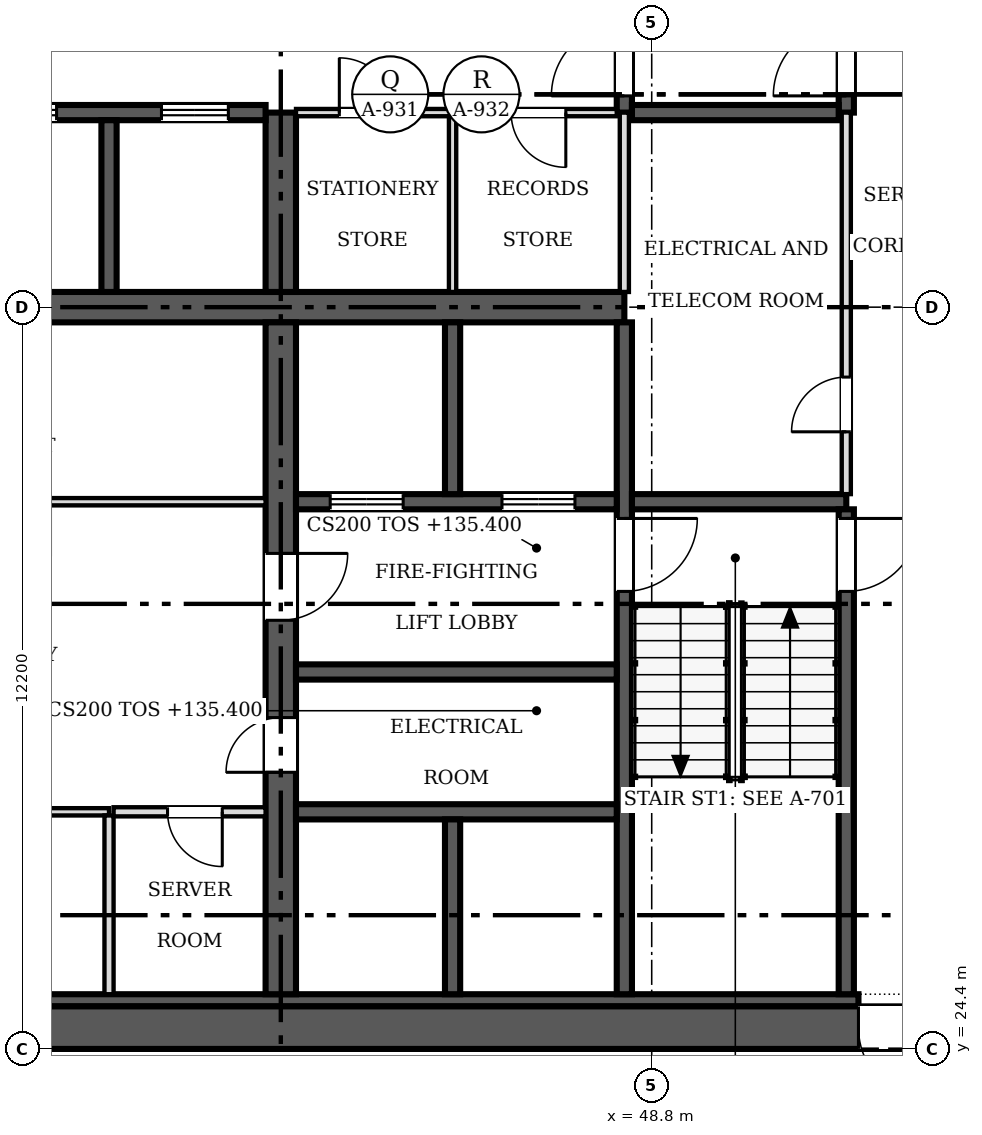
"""IFC4 building model, lengths in metres.
Left out: names, types, materials, properties, quantities, classifications, styles, units other than length and angle.
Written with IfcOpenShell. Run it as: python <this file> out.ifc"""

import sys

from ifc_helpers import new_model, si_unit, direction, frame, frame_2d, origin, place, context, subcontext, project, spatial, rectangle, extrude, source, transform, mapped, element, fill, save


model = new_model("IFC4")
c1 = context("Model", 3, precision=1e-05, world=origin(), true_north=direction((0.0, 1.0)))
c2 = subcontext(c1, "Body", "Model", "MODEL_VIEW")
j1 = project(units=[si_unit("LENGTHUNIT", "METRE"), si_unit("PLANEANGLEUNIT", "RADIAN")], contexts=[c1])
p1 = place(None, origin())
s1 = spatial("IfcSite", under=j1, at=p1, CompositionType="ELEMENT")
p2 = place(p1, origin())
s2 = spatial("IfcBuilding", under=s1, at=p2, CompositionType="ELEMENT")
p3 = place(p2, frame((0.0, 0.0, 135.4)))
s3 = spatial("IfcBuildingStorey", under=s2, at=p3, CompositionType="ELEMENT", Elevation=135.4)
p4 = place(p3, frame((54.9, 24.75, 0.0), z_axis=(0.0, 0.0, 1.0), x_axis=(-1.0, 0.0, 0.0)))
e1 = element("IfcWall", 1, at=p4, inside=s3, PredefinedType="SHEAR", context=c2, shape_type="SweptSolid", body=[
    extrude(rectangle(XDim=24.4, YDim=0.7, at=frame_2d((12.2, 0.0))), origin(), (0.0, 0.0, 1.0), 3.8),
])
m1 = source(origin(), c2, "Body", "SweptSolid", [
    extrude(rectangle(XDim=1.2, YDim=2.1, at=frame_2d((0.6, 1.05))), frame((0.0, 0.36, 0.0), z_axis=(0.0, -1.0, 0.0), x_axis=(1.0, 0.0, 0.0)), (0.0, 0.0, 1.0), 0.72),
])
p5 = place(p4, frame((1.5, 0.0, 0.0)))
e2 = element("IfcOpeningElement", 2, at=p5, cuts=e1, PredefinedType="OPENING", context=c2, shape_type="MappedRepresentation", body=[
    mapped(m1, transform((0.0, 0.0, 0.0), scale=1.0)),
])
p6 = place(p3, frame((31.2, 25.2, 0.0), z_axis=(0.0, 0.0, 1.0), x_axis=(1.0, 0.0, 0.0)))
e3 = element("IfcWall", 3, at=p6, inside=s3, PredefinedType="SOLIDWALL", context=c2, shape_type="SweptSolid", body=[
    extrude(rectangle(XDim=21.0, YDim=0.2, at=frame_2d((10.5, 0.0))), origin(), (0.0, 0.0, 1.0), 3.8),
])
p7 = place(p3, frame((31.4, 36.6, 0.0), z_axis=(0.0, 0.0, 1.0), x_axis=(1.0, 0.0, 0.0)))
e4 = element("IfcWall", 4, at=p7, inside=s3, PredefinedType="SHEAR", context=c2, shape_type="SweptSolid", body=[
    extrude(rectangle(XDim=16.95, YDim=0.5, at=frame_2d((8.475, 0.0))), origin(), (0.0, 0.0, 1.0), 3.8),
])
p8 = place(p3, frame((42.7, 36.35, 0.0), z_axis=(0.0, 0.0, 1.0), x_axis=(0.0, -1.0, 0.0)))
e5 = element("IfcWall", 5, at=p8, inside=s3, PredefinedType="SHEAR", context=c2, shape_type="SweptSolid", body=[
    extrude(rectangle(XDim=11.05, YDim=0.5, at=frame_2d((5.525, 0.0))), origin(), (0.0, 0.0, 1.0), 3.8),
])
m2 = source(origin(), c2, "Body", "SweptSolid", [
    extrude(rectangle(XDim=0.9, YDim=2.1, at=frame_2d((0.45, 1.05))), frame((0.0, 0.26, 0.0), z_axis=(0.0, -1.0, 0.0), x_axis=(1.0, 0.0, 0.0)), (0.0, 0.0, 1.0), 0.52),
])
p9 = place(p8, frame((6.5, 0.0, 0.0)))
e6 = element("IfcOpeningElement", 6, at=p9, cuts=e5, PredefinedType="OPENING", context=c2, shape_type="MappedRepresentation", body=[
    mapped(m2, transform((0.0, 0.0, 0.0), scale=1.0)),
])
m3 = source(origin(), c2, "Body", "SweptSolid", [
    extrude(rectangle(XDim=1.1, YDim=2.1, at=frame_2d((0.55, 1.05))), frame((0.0, 0.26, 0.0), z_axis=(0.0, -1.0, 0.0), x_axis=(1.0, 0.0, 0.0)), (0.0, 0.0, 1.0), 0.52),
])
p10 = place(p8, frame((3.8, 0.0, 0.0)))
e7 = element("IfcOpeningElement", 7, at=p10, cuts=e5, PredefinedType="OPENING", context=c2, shape_type="MappedRepresentation", body=[
    mapped(m3, transform((0.0, 0.0, 0.0), scale=1.0)),
])
p11 = place(p3, frame((42.7, 36.85, 0.0), z_axis=(0.0, 0.0, 1.0), x_axis=(0.0, 1.0, 0.0)))
e8 = element("IfcWall", 8, at=p11, inside=s3, PredefinedType="SHEAR", context=c2, shape_type="SweptSolid", body=[
    extrude(rectangle(XDim=2.95, YDim=0.5, at=frame_2d((1.475, 0.0))), origin(), (0.0, 0.0, 1.0), 3.8),
])
p12 = place(p3, frame((31.4, 39.8, 0.0), z_axis=(0.0, 0.0, 1.0), x_axis=(1.0, 0.0, 0.0)))
e9 = element("IfcWall", 9, at=p12, inside=s3, PredefinedType="SOLIDWALL", context=c2, shape_type="SweptSolid", body=[
    extrude(rectangle(XDim=11.05, YDim=0.25, at=frame_2d((5.525, 0.0))), origin(), (0.0, 0.0, 1.0), 3.8),
])
m4 = source(origin(), c2, "Body", "SweptSolid", [
    extrude(rectangle(XDim=1.1, YDim=2.1, at=frame_2d((0.55, 1.05))), frame((0.0, 0.135, 0.0), z_axis=(0.0, -1.0, 0.0), x_axis=(1.0, 0.0, 0.0)), (0.0, 0.0, 1.0), 0.27),
])
p13 = place(p12, frame((0.863, 0.0, 0.0)))
e10 = element("IfcOpeningElement", 10, at=p13, cuts=e9, PredefinedType="OPENING", context=c2, shape_type="MappedRepresentation", body=[
    mapped(m4, transform((0.0, 0.0, 0.0), scale=1.0)),
])
p14 = place(p12, frame((3.688, 0.0, 0.0)))
e11 = element("IfcOpeningElement", 11, at=p14, cuts=e9, PredefinedType="OPENING", context=c2, shape_type="MappedRepresentation", body=[
    mapped(m4, transform((0.0, 0.0, 0.0), scale=1.0)),
])
p15 = place(p12, frame((6.512, 0.0, 0.0)))
e12 = element("IfcOpeningElement", 12, at=p15, cuts=e9, PredefinedType="OPENING", context=c2, shape_type="MappedRepresentation", body=[
    mapped(m4, transform((0.0, 0.0, 0.0), scale=1.0)),
])
p16 = place(p12, frame((9.337, 0.0, 0.0)))
e13 = element("IfcOpeningElement", 13, at=p16, cuts=e9, PredefinedType="OPENING", context=c2, shape_type="MappedRepresentation", body=[
    mapped(m4, transform((0.0, 0.0, 0.0), scale=1.0)),
])
p17 = place(p3, frame((48.35, 36.35, 0.0), z_axis=(0.0, 0.0, 1.0), x_axis=(0.0, -1.0, 0.0)))
e14 = element("IfcWall", 14, at=p17, inside=s3, PredefinedType="SOLIDWALL", context=c2, shape_type="SweptSolid", body=[
    extrude(rectangle(XDim=11.05, YDim=0.25, at=frame_2d((5.525, 0.0))), origin(), (0.0, 0.0, 1.0), 3.8),
])
m5 = source(origin(), c2, "Body", "SweptSolid", [
    extrude(rectangle(XDim=1.2, YDim=2.1, at=frame_2d((0.6, 1.05))), frame((0.0, 0.135, 0.0), z_axis=(0.0, -1.0, 0.0), x_axis=(1.0, 0.0, 0.0)), (0.0, 0.0, 1.0), 0.27),
])
p18 = place(p17, frame((3.225, 0.0, 0.0)))
e15 = element("IfcOpeningElement", 15, at=p18, cuts=e14, PredefinedType="OPENING", context=c2, shape_type="MappedRepresentation", body=[
    mapped(m5, transform((0.0, 0.0, 0.0), scale=1.0)),
])
p19 = place(p3, frame((48.225, 33.4, 0.0), z_axis=(0.0, 0.0, 1.0), x_axis=(-1.0, 0.0, 0.0)))
e16 = element("IfcWall", 16, at=p19, inside=s3, PredefinedType="SOLIDWALL", context=c2, shape_type="SweptSolid", body=[
    extrude(rectangle(XDim=5.275, YDim=0.25, at=frame_2d((2.638, 0.0))), origin(), (0.0, 0.0, 1.0), 3.8),
])
p20 = place(p19, frame((3.512, 0.0, 0.0)))
e17 = element("IfcOpeningElement", 17, at=p20, cuts=e16, PredefinedType="OPENING", context=c2, shape_type="MappedRepresentation", body=[
    mapped(m5, transform((0.0, 0.0, 0.0), scale=1.0)),
])
p21 = place(p19, frame((0.688, 0.0, 0.0)))
e18 = element("IfcOpeningElement", 18, at=p21, cuts=e16, PredefinedType="OPENING", context=c2, shape_type="MappedRepresentation", body=[
    mapped(m5, transform((0.0, 0.0, 0.0), scale=1.0)),
])
p22 = place(p3, frame((48.475, 33.4, 0.0), z_axis=(0.0, 0.0, 1.0), x_axis=(1.0, 0.0, 0.0)))
e19 = element("IfcWall", 19, at=p22, inside=s3, PredefinedType="SOLIDWALL", context=c2, shape_type="SweptSolid", body=[
    extrude(rectangle(XDim=3.525, YDim=0.25, at=frame_2d((1.762, 0.0))), origin(), (0.0, 0.0, 1.0), 3.8),
])
p23 = place(p3, frame((48.35, 47.9, 0.0), z_axis=(0.0, 0.0, 1.0), x_axis=(0.0, -1.0, 0.0)))
e20 = element("IfcWall", 20, at=p23, inside=s3, PredefinedType="SOLIDWALL", context=c2, shape_type="SweptSolid", body=[
    extrude(rectangle(XDim=8.1, YDim=0.25, at=frame_2d((4.05, 0.0))), origin(), (0.0, 0.0, 1.0), 3.8),
])
p24 = place(p23, frame((6.625, 0.0, 0.0)))
e21 = element("IfcOpeningElement", 21, at=p24, cuts=e20, PredefinedType="OPENING", context=c2, shape_type="MappedRepresentation", body=[
    mapped(m5, transform((0.0, 0.0, 0.0), scale=1.0)),
])
p25 = place(p3, frame((52.0, 25.3, 0.0), z_axis=(0.0, 0.0, 1.0), x_axis=(0.0, 1.0, 0.0)))
e22 = element("IfcWall", 22, at=p25, inside=s3, PredefinedType="SOLIDWALL", context=c2, shape_type="SweptSolid", body=[
    extrude(rectangle(XDim=7.975, YDim=0.25, at=frame_2d((3.987, 0.0))), origin(), (0.0, 0.0, 1.0), 3.8),
])
p26 = place(p25, frame((6.625, 0.0, 0.0)))
e23 = element("IfcOpeningElement", 23, at=p26, cuts=e22, PredefinedType="OPENING", context=c2, shape_type="MappedRepresentation", body=[
    mapped(m5, transform((0.0, 0.0, 0.0), scale=1.0)),
])
p27 = place(p3, frame((52.0, 39.8, 0.0), z_axis=(0.0, 0.0, 1.0), x_axis=(0.0, 1.0, 0.0)))
e24 = element("IfcWall", 24, at=p27, inside=s3, PredefinedType="SOLIDWALL", context=c2, shape_type="SweptSolid", body=[
    extrude(rectangle(XDim=8.1, YDim=0.25, at=frame_2d((4.05, 0.0))), origin(), (0.0, 0.0, 1.0), 3.8),
])
p28 = place(p27, frame((0.275, 0.0, 0.0)))
e25 = element("IfcOpeningElement", 25, at=p28, cuts=e24, PredefinedType="OPENING", context=c2, shape_type="MappedRepresentation", body=[
    mapped(m5, transform((0.0, 0.0, 0.0), scale=1.0)),
])
for number, where, z_axis, x_axis in (
    (26, (42.95, 28.3, 0.0), (0.0, 0.0, 1.0), (1.0, 0.0, 0.0)),
    (27, (42.95, 30.6, 0.0), (0.0, 0.0, 1.0), (1.0, 0.0, 0.0)),
):
    element("IfcWall", number, at=place(p3, frame(where, z_axis=z_axis, x_axis=x_axis)), inside=s3, PredefinedType="SOLIDWALL", context=c2, shape_type="SweptSolid", body=[
        extrude(rectangle(XDim=5.275, YDim=0.25, at=frame_2d((2.638, 0.0))), origin(), (0.0, 0.0, 1.0), 3.8),
    ])
p29 = place(p3, frame((48.475, 39.8, 0.0), z_axis=(0.0, 0.0, 1.0), x_axis=(1.0, 0.0, 0.0)))
e28 = element("IfcWall", 28, at=p29, inside=s3, PredefinedType="SOLIDWALL", context=c2, shape_type="SweptSolid", body=[
    extrude(rectangle(XDim=3.4, YDim=0.25, at=frame_2d((1.7, 0.0))), origin(), (0.0, 0.0, 1.0), 3.8),
])
p30 = place(p3, frame((39.875, 36.85, 0.0), z_axis=(0.0, 0.0, 1.0), x_axis=(0.0, 1.0, 0.0)))
e29 = element("IfcWall", 29, at=p30, inside=s3, PredefinedType="SOLIDWALL", context=c2, shape_type="SweptSolid", body=[
    extrude(rectangle(XDim=2.825, YDim=0.25, at=frame_2d((1.413, 0.0))), origin(), (0.0, 0.0, 1.0), 3.8),
])
p31 = place(p3, frame((45.525, 33.525, 0.0), z_axis=(0.0, 0.0, 1.0), x_axis=(0.0, 1.0, 0.0)))
e30 = element("IfcWall", 30, at=p31, inside=s3, PredefinedType="SOLIDWALL", context=c2, shape_type="SweptSolid", body=[
    extrude(rectangle(XDim=2.825, YDim=0.25, at=frame_2d((1.413, 0.0))), origin(), (0.0, 0.0, 1.0), 3.8),
])
p32 = place(p3, frame((45.525, 25.3, 0.0), z_axis=(0.0, 0.0, 1.0), x_axis=(0.0, 1.0, 0.0)))
e31 = element("IfcWall", 31, at=p32, inside=s3, PredefinedType="SOLIDWALL", context=c2, shape_type="SweptSolid", body=[
    extrude(rectangle(XDim=2.875, YDim=0.25, at=frame_2d((1.438, 0.0))), origin(), (0.0, 0.0, 1.0), 3.8),
])
p33 = place(p3, frame((31.4, 33.4, 0.0), z_axis=(0.0, 0.0, 1.0), x_axis=(1.0, 0.0, 0.0)))
e32 = element("IfcWall", 32, at=p33, inside=s3, PredefinedType="PARTITIONING", context=c2, shape_type="SweptSolid", body=[
    extrude(rectangle(XDim=11.05, YDim=0.12, at=frame_2d((5.525, 0.0))), origin(), (0.0, 0.0, 1.0), 3.6),
])
m6 = source(origin(), c2, "Body", "SweptSolid", [
    extrude(rectangle(XDim=0.9, YDim=2.1, at=frame_2d((0.45, 1.05))), frame((0.0, 0.07, 0.0), z_axis=(0.0, -1.0, 0.0), x_axis=(1.0, 0.0, 0.0)), (0.0, 0.0, 1.0), 0.14),
])
p34 = place(p33, frame((0.962, 0.0, 0.0)))
e33 = element("IfcOpeningElement", 33, at=p34, cuts=e32, PredefinedType="OPENING", context=c2, shape_type="MappedRepresentation", body=[
    mapped(m6, transform((0.0, 0.0, 0.0), scale=1.0)),
])
p35 = place(p33, frame((6.613, 0.0, 0.0)))
e34 = element("IfcOpeningElement", 34, at=p35, cuts=e32, PredefinedType="OPENING", context=c2, shape_type="MappedRepresentation", body=[
    mapped(m6, transform((0.0, 0.0, 0.0), scale=1.0)),
])
p36 = place(p3, frame((39.875, 28.3, 0.0), z_axis=(0.0, 0.0, 1.0), x_axis=(-1.0, 0.0, 0.0)))
e35 = element("IfcWall", 35, at=p36, inside=s3, PredefinedType="PARTITIONING", context=c2, shape_type="SweptSolid", body=[
    extrude(rectangle(XDim=8.475, YDim=0.12, at=frame_2d((4.238, 0.0))), origin(), (0.0, 0.0, 1.0), 3.6),
])
p37 = place(p36, frame((3.788, 0.0, 0.0)))
e36 = element("IfcOpeningElement", 36, at=p37, cuts=e35, PredefinedType="OPENING", context=c2, shape_type="MappedRepresentation", body=[
    mapped(m6, transform((0.0, 0.0, 0.0), scale=1.0)),
])
p38 = place(p3, frame((52.0, 33.525, 0.0), z_axis=(0.0, 0.0, 1.0), x_axis=(0.0, 1.0, 0.0)))
e37 = element("IfcWall", 37, at=p38, inside=s3, PredefinedType="PARTITIONING", context=c2, shape_type="SweptSolid", body=[
    extrude(rectangle(XDim=6.275, YDim=0.15, at=frame_2d((3.138, 0.0))), origin(), (0.0, 0.0, 1.0), 3.6),
])
m7 = source(origin(), c2, "Body", "SweptSolid", [
    extrude(rectangle(XDim=0.9, YDim=2.1, at=frame_2d((0.45, 1.05))), frame((0.0, 0.085, 0.0), z_axis=(0.0, -1.0, 0.0), x_axis=(1.0, 0.0, 0.0)), (0.0, 0.0, 1.0), 0.17),
])
p39 = place(p38, frame((1.025, 0.0, 0.0)))
e38 = element("IfcOpeningElement", 38, at=p39, cuts=e37, PredefinedType="OPENING", context=c2, shape_type="MappedRepresentation", body=[
    mapped(m7, transform((0.0, 0.0, 0.0), scale=1.0)),
])
p40 = place(p3, frame((48.225, 39.8, 0.0), z_axis=(0.0, 0.0, 1.0), x_axis=(-1.0, 0.0, 0.0)))
e39 = element("IfcWall", 39, at=p40, inside=s3, PredefinedType="PARTITIONING", context=c2, shape_type="SweptSolid", body=[
    extrude(rectangle(XDim=5.275, YDim=0.12, at=frame_2d((2.638, 0.0))), origin(), (0.0, 0.0, 1.0), 3.6),
])
p41 = place(p40, frame((3.663, 0.0, 0.0)))
e40 = element("IfcOpeningElement", 40, at=p41, cuts=e39, PredefinedType="OPENING", context=c2, shape_type="MappedRepresentation", body=[
    mapped(m6, transform((0.0, 0.0, 0.0), scale=1.0)),
])
p42 = place(p40, frame((0.837, 0.0, 0.0)))
e41 = element("IfcOpeningElement", 41, at=p42, cuts=e39, PredefinedType="OPENING", context=c2, shape_type="MappedRepresentation", body=[
    mapped(m6, transform((0.0, 0.0, 0.0), scale=1.0)),
])
p43 = place(p3, frame((45.525, 36.85, 0.0), z_axis=(0.0, 0.0, 1.0), x_axis=(0.0, 1.0, 0.0)))
e42 = element("IfcWall", 42, at=p43, inside=s3, PredefinedType="PARTITIONING", context=c2, shape_type="SweptSolid", body=[
    extrude(rectangle(XDim=2.89, YDim=0.12, at=frame_2d((1.445, 0.0))), origin(), (0.0, 0.0, 1.0), 3.6),
])
p44 = place(p3, frame((48.35, 36.85, 0.0), z_axis=(0.0, 0.0, 1.0), x_axis=(0.0, 1.0, 0.0)))
e43 = element("IfcWall", 43, at=p44, inside=s3, PredefinedType="PARTITIONING", context=c2, shape_type="SweptSolid", body=[
    extrude(rectangle(XDim=2.95, YDim=0.15, at=frame_2d((1.475, 0.0))), origin(), (0.0, 0.0, 1.0), 3.6),
])
p45 = place(p3, frame((39.875, 25.3, 0.0), z_axis=(0.0, 0.0, 1.0), x_axis=(0.0, 1.0, 0.0)))
e44 = element("IfcWall", 44, at=p45, inside=s3, PredefinedType="PARTITIONING", context=c2, shape_type="SweptSolid", body=[
    extrude(rectangle(XDim=2.94, YDim=0.15, at=frame_2d((1.47, 0.0))), origin(), (0.0, 0.0, 1.0), 3.6),
])
p46 = place(p3, frame((42.45, 28.3, 0.0), z_axis=(0.0, 0.0, 1.0), x_axis=(-1.0, 0.0, 0.0)))
e45 = element("IfcWall", 45, at=p46, inside=s3, PredefinedType="PARTITIONING", context=c2, shape_type="SweptSolid", body=[
    extrude(rectangle(XDim=2.5, YDim=0.15, at=frame_2d((1.25, 0.0))), origin(), (0.0, 0.0, 1.0), 3.6),
])
p47 = place(p46, frame((0.712, 0.0, 0.0)))
e46 = element("IfcOpeningElement", 46, at=p47, cuts=e45, PredefinedType="OPENING", context=c2, shape_type="MappedRepresentation", body=[
    mapped(m7, transform((0.0, 0.0, 0.0), scale=1.0)),
])
m8 = source(origin(), c2, "Body", "SweptSolid", [
    extrude(rectangle(XDim=1.2, YDim=2.1, at=frame_2d((0.6, 1.05))), frame((0.0, 0.025, 0.0), z_axis=(0.0, -1.0, 0.0), x_axis=(1.0, 0.0, 0.0)), (0.0, 0.0, 1.0), 0.05),
])
p48 = place(p5, origin())
e47 = element("IfcDoor", 47, at=p48, inside=s3, OperationType="SINGLE_SWING_LEFT", PredefinedType="DOOR", context=c2, shape_type="MappedRepresentation", body=[
    mapped(m8, transform((0.0, 0.0, 0.0), scale=1.0)),
])
fill(e2, e47)
m9 = source(origin(), c2, "Body", "SweptSolid", [
    extrude(rectangle(XDim=0.9, YDim=2.1, at=frame_2d((0.45, 1.05))), frame((0.0, 0.025, 0.0), z_axis=(0.0, -1.0, 0.0), x_axis=(1.0, 0.0, 0.0)), (0.0, 0.0, 1.0), 0.05),
])
p49 = place(p9, origin())
e48 = element("IfcDoor", 48, at=p49, inside=s3, OperationType="SINGLE_SWING_RIGHT", PredefinedType="DOOR", context=c2, shape_type="MappedRepresentation", body=[
    mapped(m9, transform((0.0, 0.0, 0.0), scale=1.0)),
])
fill(e6, e48)
m10 = source(origin(), c2, "Body", "SweptSolid", [
    extrude(rectangle(XDim=1.1, YDim=2.1, at=frame_2d((0.55, 1.05))), frame((0.0, 0.025, 0.0), z_axis=(0.0, -1.0, 0.0), x_axis=(1.0, 0.0, 0.0)), (0.0, 0.0, 1.0), 0.05),
])
p50 = place(p10, origin())
e49 = element("IfcDoor", 49, at=p50, inside=s3, OperationType="SINGLE_SWING_LEFT", PredefinedType="DOOR", context=c2, shape_type="MappedRepresentation", body=[
    mapped(m10, transform((0.0, 0.0, 0.0), scale=1.0)),
])
fill(e7, e49)
p51 = place(p15, origin())
e50 = element("IfcDoor", 50, at=p51, inside=s3, OperationType="DOUBLE_DOOR_SLIDING", PredefinedType="DOOR", context=c2, shape_type="MappedRepresentation", body=[
    mapped(m10, transform((0.0, 0.0, 0.0), scale=1.0)),
])
fill(e12, e50)
p52 = place(p16, origin())
e51 = element("IfcDoor", 51, at=p52, inside=s3, OperationType="DOUBLE_DOOR_SLIDING", PredefinedType="DOOR", context=c2, shape_type="MappedRepresentation", body=[
    mapped(m10, transform((0.0, 0.0, 0.0), scale=1.0)),
])
fill(e13, e51)
p53 = place(p18, origin())
e52 = element("IfcDoor", 52, at=p53, inside=s3, OperationType="SINGLE_SWING_LEFT", PredefinedType="DOOR", context=c2, shape_type="MappedRepresentation", body=[
    mapped(m8, transform((0.0, 0.0, 0.0), scale=1.0)),
])
fill(e15, e52)
p54 = place(p20, origin())
e53 = element("IfcDoor", 53, at=p54, inside=s3, OperationType="DOUBLE_DOOR_SLIDING", PredefinedType="DOOR", context=c2, shape_type="MappedRepresentation", body=[
    mapped(m8, transform((0.0, 0.0, 0.0), scale=1.0)),
])
fill(e17, e53)
p55 = place(p21, origin())
e54 = element("IfcDoor", 54, at=p55, inside=s3, OperationType="DOUBLE_DOOR_SLIDING", PredefinedType="DOOR", context=c2, shape_type="MappedRepresentation", body=[
    mapped(m8, transform((0.0, 0.0, 0.0), scale=1.0)),
])
fill(e18, e54)
p56 = place(p24, origin())
e55 = element("IfcDoor", 55, at=p56, inside=s3, OperationType="SINGLE_SWING_RIGHT", PredefinedType="DOOR", context=c2, shape_type="MappedRepresentation", body=[
    mapped(m8, transform((0.0, 0.0, 0.0), scale=1.0)),
])
fill(e21, e55)
p57 = place(p26, origin())
e56 = element("IfcDoor", 56, at=p57, inside=s3, OperationType="SINGLE_SWING_RIGHT", PredefinedType="DOOR", context=c2, shape_type="MappedRepresentation", body=[
    mapped(m8, transform((0.0, 0.0, 0.0), scale=1.0)),
])
fill(e23, e56)
p58 = place(p28, origin())
e57 = element("IfcDoor", 57, at=p58, inside=s3, OperationType="SINGLE_SWING_LEFT", PredefinedType="DOOR", context=c2, shape_type="MappedRepresentation", body=[
    mapped(m8, transform((0.0, 0.0, 0.0), scale=1.0)),
])
fill(e25, e57)
p59 = place(p39, origin())
e58 = element("IfcDoor", 58, at=p59, inside=s3, OperationType="SINGLE_SWING_LEFT", PredefinedType="DOOR", context=c2, shape_type="MappedRepresentation", body=[
    mapped(m9, transform((0.0, 0.0, 0.0), scale=1.0)),
])
fill(e38, e58)
p60 = place(p41, origin())
e59 = element("IfcDoor", 59, at=p60, inside=s3, OperationType="SINGLE_SWING_RIGHT", PredefinedType="DOOR", context=c2, shape_type="MappedRepresentation", body=[
    mapped(m9, transform((0.0, 0.0, 0.0), scale=1.0)),
])
fill(e40, e59)
p61 = place(p42, origin())
e60 = element("IfcDoor", 60, at=p61, inside=s3, OperationType="SINGLE_SWING_LEFT", PredefinedType="DOOR", context=c2, shape_type="MappedRepresentation", body=[
    mapped(m9, transform((0.0, 0.0, 0.0), scale=1.0)),
])
fill(e41, e60)
p62 = place(p47, origin())
e61 = element("IfcDoor", 61, at=p62, inside=s3, OperationType="SINGLE_SWING_LEFT", PredefinedType="DOOR", context=c2, shape_type="MappedRepresentation", body=[
    mapped(m9, transform((0.0, 0.0, 0.0), scale=1.0)),
])
fill(e46, e61)
save(model, sys.argv[1])
